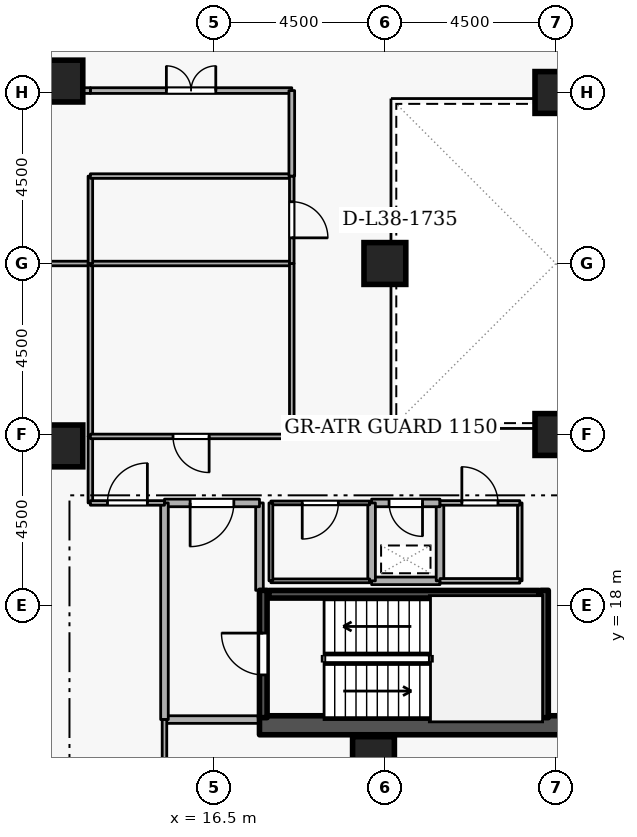
"""IFC4 building model, lengths in metres.
Left out: names, types, materials, properties, quantities, classifications, styles, units other than length and angle.
Written with IfcOpenShell. Run it as: python <this file> out.ifc"""

import sys

from ifc_helpers import new_model, si_unit, direction, frame, frame_2d, origin, origin_2d, place, context, subcontext, project, spatial, rectangle, extrude, element, fill, save


model = new_model("IFC4")
c1 = context("Model", 3, precision=1e-05, world=origin(), true_north=direction((0.0, 1.0)))
c2 = subcontext(c1, "Body", "Model", "MODEL_VIEW")
j1 = project(units=[si_unit("LENGTHUNIT", "METRE"), si_unit("PLANEANGLEUNIT", "RADIAN")], contexts=[c1])
p1 = place(None, origin())
s1 = spatial("IfcSite", under=j1, at=p1, CompositionType="ELEMENT")
p2 = place(p1, origin())
s2 = spatial("IfcBuilding", under=s1, at=p2, CompositionType="ELEMENT")
p3 = place(p2, frame((0.0, 0.0, 145.5)))
s3 = spatial("IfcBuildingStorey", under=s2, at=p3, CompositionType="ELEMENT", Elevation=145.5)
p4 = place(p3, frame((17.7, 14.85, 0.0), z_axis=(0.0, 0.0, 1.0), x_axis=(1.0, 0.0, 0.0)))
e1 = element("IfcWall", 1, at=p4, inside=s3, PredefinedType="SHEAR", context=c2, shape_type="SweptSolid", body=[
    extrude(rectangle(XDim=15.6, YDim=0.5, at=frame_2d((7.8, 0.0))), origin(), (0.0, 0.0, 1.0), 3.6),
])
for number, where, z_axis, x_axis in (
    (2, (12.5, 22.2, 0.0), (0.0, 0.0, 1.0), (1.0, 0.0, 0.0)),
    (3, (12.5, 31.8, 0.0), (0.0, 0.0, 1.0), (1.0, 0.0, 0.0)),
    (4, (20.7, 14.0, 0.0), (0.0, 0.0, 1.0), (1.0, 0.0, 0.0)),
    (5, (25.5, 22.5, 0.0), (0.0, 0.0, 1.0), (1.0, 0.0, 0.0)),
    (6, (25.5, 31.5, 0.0), (0.0, 0.0, 1.0), (1.0, 0.0, 0.0)),
    (7, (21.0, 27.0, 0.0), (0.0, 0.0, 1.0), (1.0, 0.0, 0.0)),
):
    element("IfcColumn", number, at=place(p3, frame(where, z_axis=z_axis, x_axis=x_axis)), inside=s3, PredefinedType="COLUMN", context=c2, shape_type="SweptSolid", body=[
        extrude(rectangle(XDim=1.1, YDim=1.1, at=origin_2d()), origin(), (0.0, 0.0, 1.0), 3.6),
    ])
p5 = place(p3, frame((17.8, 15.05, 0.0), z_axis=(0.0, 0.0, 1.0), x_axis=(0.0, 1.0, 0.0)))
e8 = element("IfcWall", 8, at=p5, inside=s3, PredefinedType="SHEAR", context=c2, shape_type="SweptSolid", body=[
    extrude(rectangle(XDim=3.35, YDim=0.2, at=frame_2d((1.675, 0.0))), origin(), (0.0, 0.0, 1.0), 3.6),
])
p6 = place(p5, frame((1.125, 0.0, 0.0)))
e9 = element("IfcOpeningElement", 9, at=p6, cuts=e8, PredefinedType="OPENING", context=c2, shape_type="SweptSolid", body=[
    extrude(rectangle(XDim=1.1, YDim=2.1, at=frame_2d((0.55, 1.05))), frame((0.0, 0.11, 0.0), z_axis=(0.0, -1.0, 0.0), x_axis=(1.0, 0.0, 0.0)), (0.0, 0.0, 1.0), 0.22),
])
p7 = place(p3, frame((25.2, 18.4, 0.0), z_axis=(0.0, 0.0, 1.0), x_axis=(0.0, -1.0, 0.0)))
e10 = element("IfcWall", 10, at=p7, inside=s3, PredefinedType="SHEAR", context=c2, shape_type="SweptSolid", body=[
    extrude(rectangle(XDim=3.35, YDim=0.2, at=frame_2d((1.675, 0.0))), origin(), (0.0, 0.0, 1.0), 3.6),
])
p8 = place(p3, frame((25.05, 18.297, 0.0), z_axis=(0.0, 0.0, 1.0), x_axis=(-1.0, 0.0, 0.0)))
e11 = element("IfcWall", 11, at=p8, inside=s3, PredefinedType="SHEAR", context=c2, shape_type="SweptSolid", body=[
    extrude(rectangle(XDim=7.1, YDim=0.2, at=frame_2d((3.55, 0.0))), origin(), (0.0, 0.0, 1.0), 3.6),
])
p9 = place(p3, frame((15.2, 15.0, 0.0), z_axis=(0.0, 0.0, 1.0), x_axis=(1.0, 0.0, 0.0)))
e12 = element("IfcWall", 12, at=p9, inside=s3, PredefinedType="STANDARD", context=c2, shape_type="SweptSolid", body=[
    extrude(rectangle(XDim=2.5, YDim=0.2, at=frame_2d((1.25, 0.0))), origin(), (0.0, 0.0, 1.0), 3.3),
])
p10 = place(p3, frame((17.7, 18.4, 0.0), z_axis=(0.0, 0.0, 1.0), x_axis=(0.0, 1.0, 0.0)))
e13 = element("IfcWall", 13, at=p10, inside=s3, PredefinedType="STANDARD", context=c2, shape_type="SweptSolid", body=[
    extrude(rectangle(XDim=2.3, YDim=0.2, at=frame_2d((1.15, 0.0))), origin(), (0.0, 0.0, 1.0), 2.505),
])
p11 = place(p3, frame((17.7, 20.7, 0.0), z_axis=(0.0, 0.0, 1.0), x_axis=(-1.0, 0.0, 0.0)))
e14 = element("IfcWall", 14, at=p11, inside=s3, PredefinedType="STANDARD", context=c2, shape_type="SweptSolid", body=[
    extrude(rectangle(XDim=2.5, YDim=0.2, at=frame_2d((1.25, 0.0))), origin(), (0.0, 0.0, 1.0), 3.3),
])
p12 = place(p11, frame((0.675, 0.0, 0.0)))
e15 = element("IfcOpeningElement", 15, at=p12, cuts=e14, PredefinedType="OPENING", context=c2, shape_type="SweptSolid", body=[
    extrude(rectangle(XDim=1.15, YDim=2.1, at=frame_2d((0.575, 1.05))), frame((0.0, 0.11, 0.0), z_axis=(0.0, -1.0, 0.0), x_axis=(1.0, 0.0, 0.0)), (0.0, 0.0, 1.0), 0.22),
])
p13 = place(p3, frame((15.2, 20.7, 0.0), z_axis=(0.0, 0.0, 1.0), x_axis=(0.0, -1.0, 0.0)))
e16 = element("IfcWall", 16, at=p13, inside=s3, PredefinedType="STANDARD", context=c2, shape_type="SweptSolid", body=[
    extrude(rectangle(XDim=5.7, YDim=0.2, at=frame_2d((2.85, 0.0))), origin(), (0.0, 0.0, 1.0), 3.3),
])
p14 = place(p3, frame((20.65, 18.65, 0.0), z_axis=(0.0, 0.0, 1.0), x_axis=(1.0, 0.0, 0.0)))
e17 = element("IfcWall", 17, at=p14, inside=s3, PredefinedType="STANDARD", context=c2, shape_type="SweptSolid", body=[
    extrude(rectangle(XDim=1.8, YDim=0.2, at=frame_2d((0.9, 0.0))), origin(), (0.0, 0.0, 1.0), 3.3),
])
p15 = place(p3, frame((22.45, 18.65, 0.0), z_axis=(0.0, 0.0, 1.0), x_axis=(0.0, 1.0, 0.0)))
e18 = element("IfcWall", 18, at=p15, inside=s3, PredefinedType="STANDARD", context=c2, shape_type="SweptSolid", body=[
    extrude(rectangle(XDim=2.05, YDim=0.2, at=frame_2d((1.025, 0.0))), origin(), (0.0, 0.0, 1.0), 3.3),
])
p16 = place(p3, frame((22.45, 20.7, 0.0), z_axis=(0.0, 0.0, 1.0), x_axis=(-1.0, 0.0, 0.0)))
e19 = element("IfcWall", 19, at=p16, inside=s3, PredefinedType="STANDARD", context=c2, shape_type="SweptSolid", body=[
    extrude(rectangle(XDim=1.8, YDim=0.2, at=frame_2d((0.9, 0.0))), origin(), (0.0, 0.0, 1.0), 3.3),
])
p17 = place(p16, frame((0.46, 0.0, 0.0)))
e20 = element("IfcOpeningElement", 20, at=p17, cuts=e19, PredefinedType="OPENING", context=c2, shape_type="SweptSolid", body=[
    extrude(rectangle(XDim=0.88, YDim=2.04, at=frame_2d((0.44, 1.02))), frame((0.0, 0.11, 0.0), z_axis=(0.0, -1.0, 0.0), x_axis=(1.0, 0.0, 0.0)), (0.0, 0.0, 1.0), 0.22),
])
p18 = place(p3, frame((20.65, 20.7, 0.0), z_axis=(0.0, 0.0, 1.0), x_axis=(0.0, -1.0, 0.0)))
e21 = element("IfcWall", 21, at=p18, inside=s3, PredefinedType="STANDARD", context=c2, shape_type="SweptSolid", body=[
    extrude(rectangle(XDim=2.05, YDim=0.2, at=frame_2d((1.025, 0.0))), origin(), (0.0, 0.0, 1.0), 3.3),
])
p19 = place(p3, frame((18.0, 18.65, 0.0), z_axis=(0.0, 0.0, 1.0), x_axis=(1.0, 0.0, 0.0)))
e22 = element("IfcWall", 22, at=p19, inside=s3, PredefinedType="PARTITIONING", context=c2, shape_type="SweptSolid", body=[
    extrude(rectangle(XDim=2.6, YDim=0.1, at=frame_2d((1.3, 0.0))), origin(), (0.0, 0.0, 1.0), 3.3),
])
p20 = place(p3, frame((20.6, 20.7, 0.0), z_axis=(0.0, 0.0, 1.0), x_axis=(-1.0, 0.0, 0.0)))
e23 = element("IfcWall", 23, at=p20, inside=s3, PredefinedType="PARTITIONING", context=c2, shape_type="SweptSolid", body=[
    extrude(rectangle(XDim=2.6, YDim=0.1, at=frame_2d((1.3, 0.0))), origin(), (0.0, 0.0, 1.0), 3.3),
])
p21 = place(p20, frame((0.825, 0.0, 0.0)))
e24 = element("IfcOpeningElement", 24, at=p21, cuts=e23, PredefinedType="OPENING", context=c2, shape_type="SweptSolid", body=[
    extrude(rectangle(XDim=0.95, YDim=2.1, at=frame_2d((0.475, 1.05))), frame((0.0, 0.06, 0.0), z_axis=(0.0, -1.0, 0.0), x_axis=(1.0, 0.0, 0.0)), (0.0, 0.0, 1.0), 0.12),
])
p22 = place(p3, frame((18.0, 20.7, 0.0), z_axis=(0.0, 0.0, 1.0), x_axis=(0.0, -1.0, 0.0)))
e25 = element("IfcWall", 25, at=p22, inside=s3, PredefinedType="PARTITIONING", context=c2, shape_type="SweptSolid", body=[
    extrude(rectangle(XDim=2.05, YDim=0.1, at=frame_2d((1.025, 0.0))), origin(), (0.0, 0.0, 1.0), 2.505),
])
p23 = place(p3, frame((24.55, 20.7, 0.0), z_axis=(0.0, 0.0, 1.0), x_axis=(0.0, -1.0, 0.0)))
e26 = element("IfcWall", 26, at=p23, inside=s3, PredefinedType="PARTITIONING", context=c2, shape_type="SweptSolid", body=[
    extrude(rectangle(XDim=2.05, YDim=0.12, at=frame_2d((1.025, 0.0))), origin(), (0.0, 0.0, 1.0), 3.3),
])
p24 = place(p3, frame((24.55, 18.65, 0.0), z_axis=(0.0, 0.0, 1.0), x_axis=(-1.0, 0.0, 0.0)))
e27 = element("IfcWall", 27, at=p24, inside=s3, PredefinedType="PARTITIONING", context=c2, shape_type="SweptSolid", body=[
    extrude(rectangle(XDim=2.1, YDim=0.12, at=frame_2d((1.05, 0.0))), origin(), (0.0, 0.0, 1.0), 3.3),
])
p25 = place(p3, frame((22.45, 20.7, 0.0), z_axis=(0.0, 0.0, 1.0), x_axis=(1.0, 0.0, 0.0)))
e28 = element("IfcWall", 28, at=p25, inside=s3, PredefinedType="PARTITIONING", context=c2, shape_type="SweptSolid", body=[
    extrude(rectangle(XDim=2.1, YDim=0.12, at=frame_2d((1.05, 0.0))), origin(), (0.0, 0.0, 1.0), 3.3),
])
p26 = place(p25, frame((0.575, 0.0, 0.0)))
e29 = element("IfcOpeningElement", 29, at=p26, cuts=e28, PredefinedType="OPENING", context=c2, shape_type="SweptSolid", body=[
    extrude(rectangle(XDim=0.95, YDim=2.1, at=frame_2d((0.475, 1.05))), frame((0.0, 0.07, 0.0), z_axis=(0.0, -1.0, 0.0), x_axis=(1.0, 0.0, 0.0)), (0.0, 0.0, 1.0), 0.14),
])
p27 = place(p3, frame((13.25, 22.45, 0.0), z_axis=(0.0, 0.0, 1.0), x_axis=(0.0, -1.0, 0.0)))
e30 = element("IfcWall", 30, at=p27, inside=s3, PredefinedType="PARTITIONING", context=c2, shape_type="SweptSolid", body=[
    extrude(rectangle(XDim=1.75, YDim=0.12, at=frame_2d((0.875, 0.0))), origin(), (0.0, 0.0, 1.0), 3.3),
])
p28 = place(p3, frame((13.25, 20.7, 0.0), z_axis=(0.0, 0.0, 1.0), x_axis=(1.0, 0.0, 0.0)))
e31 = element("IfcWall", 31, at=p28, inside=s3, PredefinedType="PARTITIONING", context=c2, shape_type="SweptSolid", body=[
    extrude(rectangle(XDim=1.95, YDim=0.12, at=frame_2d((0.975, 0.0))), origin(), (0.0, 0.0, 1.0), 3.3),
])
p29 = place(p28, frame((0.45, 0.0, 0.0)))
e32 = element("IfcOpeningElement", 32, at=p29, cuts=e31, PredefinedType="OPENING", context=c2, shape_type="SweptSolid", body=[
    extrude(rectangle(XDim=1.05, YDim=2.1, at=frame_2d((0.525, 1.05))), frame((0.0, 0.07, 0.0), z_axis=(0.0, -1.0, 0.0), x_axis=(1.0, 0.0, 0.0)), (0.0, 0.0, 1.0), 0.14),
])
p30 = place(p3, frame((15.2, 15.0, 0.0), z_axis=(0.0, 0.0, 1.0), x_axis=(0.0, -1.0, 0.0)))
e33 = element("IfcWall", 33, at=p30, inside=s3, PredefinedType="PARTITIONING", context=c2, shape_type="SweptSolid", body=[
    extrude(rectangle(XDim=11.72, YDim=0.12, at=frame_2d((5.86, 0.0))), origin(), (0.0, 0.0, 1.0), 3.3),
])
p31 = place(p3, frame((1.78, 27.0, 0.0), z_axis=(0.0, 0.0, 1.0), x_axis=(1.0, 0.0, 0.0)))
e34 = element("IfcWall", 34, at=p31, inside=s3, PredefinedType="PARTITIONING", context=c2, shape_type="SweptSolid", body=[
    extrude(rectangle(XDim=11.47, YDim=0.12, at=frame_2d((5.735, 0.0))), origin(), (0.0, 0.0, 1.0), 2.842),
])
p32 = place(p3, frame((13.25, 27.0, 0.0), z_axis=(0.0, 0.0, 1.0), x_axis=(0.0, -1.0, 0.0)))
e35 = element("IfcWall", 35, at=p32, inside=s3, PredefinedType="PARTITIONING", context=c2, shape_type="SweptSolid", body=[
    extrude(rectangle(XDim=4.55, YDim=0.12, at=frame_2d((2.275, 0.0))), origin(), (0.0, 0.0, 1.0), 3.3),
])
p33 = place(p3, frame((13.25, 27.0, 0.0), z_axis=(0.0, 0.0, 1.0), x_axis=(1.0, 0.0, 0.0)))
e36 = element("IfcWall", 36, at=p33, inside=s3, PredefinedType="PARTITIONING", context=c2, shape_type="SweptSolid", body=[
    extrude(rectangle(XDim=5.3, YDim=0.12, at=frame_2d((2.65, 0.0))), origin(), (0.0, 0.0, 1.0), 3.3),
])
p34 = place(p3, frame((18.55, 27.0, 0.0), z_axis=(0.0, 0.0, 1.0), x_axis=(0.0, -1.0, 0.0)))
e37 = element("IfcWall", 37, at=p34, inside=s3, PredefinedType="PARTITIONING", context=c2, shape_type="SweptSolid", body=[
    extrude(rectangle(XDim=4.55, YDim=0.12, at=frame_2d((2.275, 0.0))), origin(), (0.0, 0.0, 1.0), 3.3),
])
p35 = place(p3, frame((18.55, 22.45, 0.0), z_axis=(0.0, 0.0, 1.0), x_axis=(-1.0, 0.0, 0.0)))
e38 = element("IfcWall", 38, at=p35, inside=s3, PredefinedType="PARTITIONING", context=c2, shape_type="SweptSolid", body=[
    extrude(rectangle(XDim=5.3, YDim=0.12, at=frame_2d((2.65, 0.0))), origin(), (0.0, 0.0, 1.0), 3.3),
])
p36 = place(p35, frame((2.175, 0.0, 0.0)))
e39 = element("IfcOpeningElement", 39, at=p36, cuts=e38, PredefinedType="OPENING", context=c2, shape_type="SweptSolid", body=[
    extrude(rectangle(XDim=0.95, YDim=2.1, at=frame_2d((0.475, 1.05))), frame((0.0, 0.07, 0.0), z_axis=(0.0, -1.0, 0.0), x_axis=(1.0, 0.0, 0.0)), (0.0, 0.0, 1.0), 0.14),
])
p37 = place(p3, frame((13.25, 27.0, 0.0), z_axis=(0.0, 0.0, 1.0), x_axis=(0.0, 1.0, 0.0)))
e40 = element("IfcWall", 40, at=p37, inside=s3, PredefinedType="PARTITIONING", context=c2, shape_type="SweptSolid", body=[
    extrude(rectangle(XDim=2.3, YDim=0.12, at=frame_2d((1.15, 0.0))), origin(), (0.0, 0.0, 1.0), 3.3),
])
p38 = place(p3, frame((13.25, 29.3, 0.0), z_axis=(0.0, 0.0, 1.0), x_axis=(1.0, 0.0, 0.0)))
e41 = element("IfcWall", 41, at=p38, inside=s3, PredefinedType="PARTITIONING", context=c2, shape_type="SweptSolid", body=[
    extrude(rectangle(XDim=5.3, YDim=0.12, at=frame_2d((2.65, 0.0))), origin(), (0.0, 0.0, 1.0), 3.3),
])
p39 = place(p3, frame((18.55, 29.3, 0.0), z_axis=(0.0, 0.0, 1.0), x_axis=(0.0, -1.0, 0.0)))
e42 = element("IfcWall", 42, at=p39, inside=s3, PredefinedType="PARTITIONING", context=c2, shape_type="SweptSolid", body=[
    extrude(rectangle(XDim=2.3, YDim=0.12, at=frame_2d((1.15, 0.0))), origin(), (0.0, 0.0, 1.0), 3.3),
])
p40 = place(p39, frame((0.675, 0.0, 0.0)))
e43 = element("IfcOpeningElement", 43, at=p40, cuts=e42, PredefinedType="OPENING", context=c2, shape_type="SweptSolid", body=[
    extrude(rectangle(XDim=0.95, YDim=2.1, at=frame_2d((0.475, 1.05))), frame((0.0, 0.07, 0.0), z_axis=(0.0, -1.0, 0.0), x_axis=(1.0, 0.0, 0.0)), (0.0, 0.0, 1.0), 0.14),
])
p41 = place(p3, frame((13.25, 31.55, 0.0), z_axis=(0.0, 0.0, 1.0), x_axis=(1.0, 0.0, 0.0)))
e44 = element("IfcWall", 44, at=p41, inside=s3, PredefinedType="PARTITIONING", context=c2, shape_type="SweptSolid", body=[
    extrude(rectangle(XDim=5.3, YDim=0.15, at=frame_2d((2.65, 0.0))), origin(), (0.0, 0.0, 1.0), 3.3),
])
p42 = place(p41, frame((2.0, 0.0, 0.0)))
e45 = element("IfcOpeningElement", 45, at=p42, cuts=e44, PredefinedType="OPENING", context=c2, shape_type="SweptSolid", body=[
    extrude(rectangle(XDim=1.3, YDim=2.12, at=frame_2d((0.65, 1.06))), frame((0.0, 0.085, 0.0), z_axis=(0.0, -1.0, 0.0), x_axis=(1.0, 0.0, 0.0)), (0.0, 0.0, 1.0), 0.17),
])
p43 = place(p3, frame((18.55, 31.55, 0.0), z_axis=(0.0, 0.0, 1.0), x_axis=(0.0, -1.0, 0.0)))
e46 = element("IfcWall", 46, at=p43, inside=s3, PredefinedType="PARTITIONING", context=c2, shape_type="SweptSolid", body=[
    extrude(rectangle(XDim=2.25, YDim=0.15, at=frame_2d((1.125, 0.0))), origin(), (0.0, 0.0, 1.0), 3.3),
])
p44 = place(p3, frame((10.9, 31.55, 0.0), z_axis=(0.0, 0.0, 1.0), x_axis=(1.0, 0.0, 0.0)))
e47 = element("IfcWall", 47, at=p44, inside=s3, PredefinedType="PARTITIONING", context=c2, shape_type="SweptSolid", body=[
    extrude(rectangle(XDim=2.35, YDim=0.15, at=frame_2d((1.175, 0.0))), origin(), (0.0, 0.0, 1.0), 3.3),
])
p45 = place(p6, origin())
e48 = element("IfcDoor", 48, at=p45, inside=s3, OperationType="SINGLE_SWING_RIGHT", PredefinedType="DOOR", context=c2, shape_type="SweptSolid", body=[
    extrude(rectangle(XDim=1.1, YDim=2.1, at=frame_2d((0.55, 1.05))), frame((0.0, 0.025, 0.0), z_axis=(0.0, -1.0, 0.0), x_axis=(1.0, 0.0, 0.0)), (0.0, 0.0, 1.0), 0.05),
])
fill(e9, e48)
p46 = place(p12, origin())
e49 = element("IfcDoor", 49, at=p46, inside=s3, OperationType="SINGLE_SWING_RIGHT", PredefinedType="DOOR", context=c2, shape_type="SweptSolid", body=[
    extrude(rectangle(XDim=1.15, YDim=2.1, at=frame_2d((0.575, 1.05))), frame((0.0, 0.025, 0.0), z_axis=(0.0, -1.0, 0.0), x_axis=(1.0, 0.0, 0.0)), (0.0, 0.0, 1.0), 0.05),
])
fill(e15, e49)
p47 = place(p17, origin())
e50 = element("IfcDoor", 50, at=p47, inside=s3, OperationType="SINGLE_SWING_LEFT", PredefinedType="DOOR", context=c2, shape_type="SweptSolid", body=[
    extrude(rectangle(XDim=0.88, YDim=2.04, at=frame_2d((0.44, 1.02))), frame((0.0, 0.025, 0.0), z_axis=(0.0, -1.0, 0.0), x_axis=(1.0, 0.0, 0.0)), (0.0, 0.0, 1.0), 0.05),
])
fill(e20, e50)
p48 = place(p21, origin())
e51 = element("IfcDoor", 51, at=p48, inside=s3, OperationType="SINGLE_SWING_RIGHT", PredefinedType="DOOR", context=c2, shape_type="SweptSolid", body=[
    extrude(rectangle(XDim=0.95, YDim=2.1, at=frame_2d((0.475, 1.05))), frame((0.0, 0.025, 0.0), z_axis=(0.0, -1.0, 0.0), x_axis=(1.0, 0.0, 0.0)), (0.0, 0.0, 1.0), 0.05),
])
fill(e24, e51)
p49 = place(p26, origin())
e52 = element("IfcDoor", 52, at=p49, inside=s3, OperationType="SINGLE_SWING_LEFT", PredefinedType="DOOR", context=c2, shape_type="SweptSolid", body=[
    extrude(rectangle(XDim=0.95, YDim=2.1, at=frame_2d((0.475, 1.05))), frame((0.0, 0.025, 0.0), z_axis=(0.0, -1.0, 0.0), x_axis=(1.0, 0.0, 0.0)), (0.0, 0.0, 1.0), 0.05),
])
fill(e29, e52)
p50 = place(p29, origin())
e53 = element("IfcDoor", 53, at=p50, inside=s3, OperationType="SINGLE_SWING_RIGHT", PredefinedType="DOOR", context=c2, shape_type="SweptSolid", body=[
    extrude(rectangle(XDim=1.05, YDim=2.1, at=frame_2d((0.525, 1.05))), frame((0.0, 0.025, 0.0), z_axis=(0.0, -1.0, 0.0), x_axis=(1.0, 0.0, 0.0)), (0.0, 0.0, 1.0), 0.05),
])
fill(e32, e53)
p51 = place(p36, origin())
e54 = element("IfcDoor", 54, at=p51, inside=s3, OperationType="SINGLE_SWING_LEFT", PredefinedType="DOOR", context=c2, shape_type="SweptSolid", body=[
    extrude(rectangle(XDim=0.95, YDim=2.1, at=frame_2d((0.475, 1.05))), frame((0.0, 0.025, 0.0), z_axis=(0.0, -1.0, 0.0), x_axis=(1.0, 0.0, 0.0)), (0.0, 0.0, 1.0), 0.05),
])
fill(e39, e54)
p52 = place(p40, origin())
e55 = element("IfcDoor", 55, at=p52, inside=s3, OperationType="SINGLE_SWING_RIGHT", PredefinedType="DOOR", context=c2, shape_type="SweptSolid", body=[
    extrude(rectangle(XDim=0.95, YDim=2.1, at=frame_2d((0.475, 1.05))), frame((0.0, 0.025, 0.0), z_axis=(0.0, -1.0, 0.0), x_axis=(1.0, 0.0, 0.0)), (0.0, 0.0, 1.0), 0.05),
])
fill(e43, e55)
p53 = place(p42, origin())
e56 = element("IfcDoor", 56, at=p53, inside=s3, OperationType="DOUBLE_DOOR_SINGLE_SWING", PredefinedType="DOOR", context=c2, shape_type="SweptSolid", body=[
    extrude(rectangle(XDim=1.3, YDim=2.12, at=frame_2d((0.65, 1.06))), frame((0.0, 0.025, 0.0), z_axis=(0.0, -1.0, 0.0), x_axis=(1.0, 0.0, 0.0)), (0.0, 0.0, 1.0), 0.05),
])
fill(e45, e56)
save(model, sys.argv[1])
